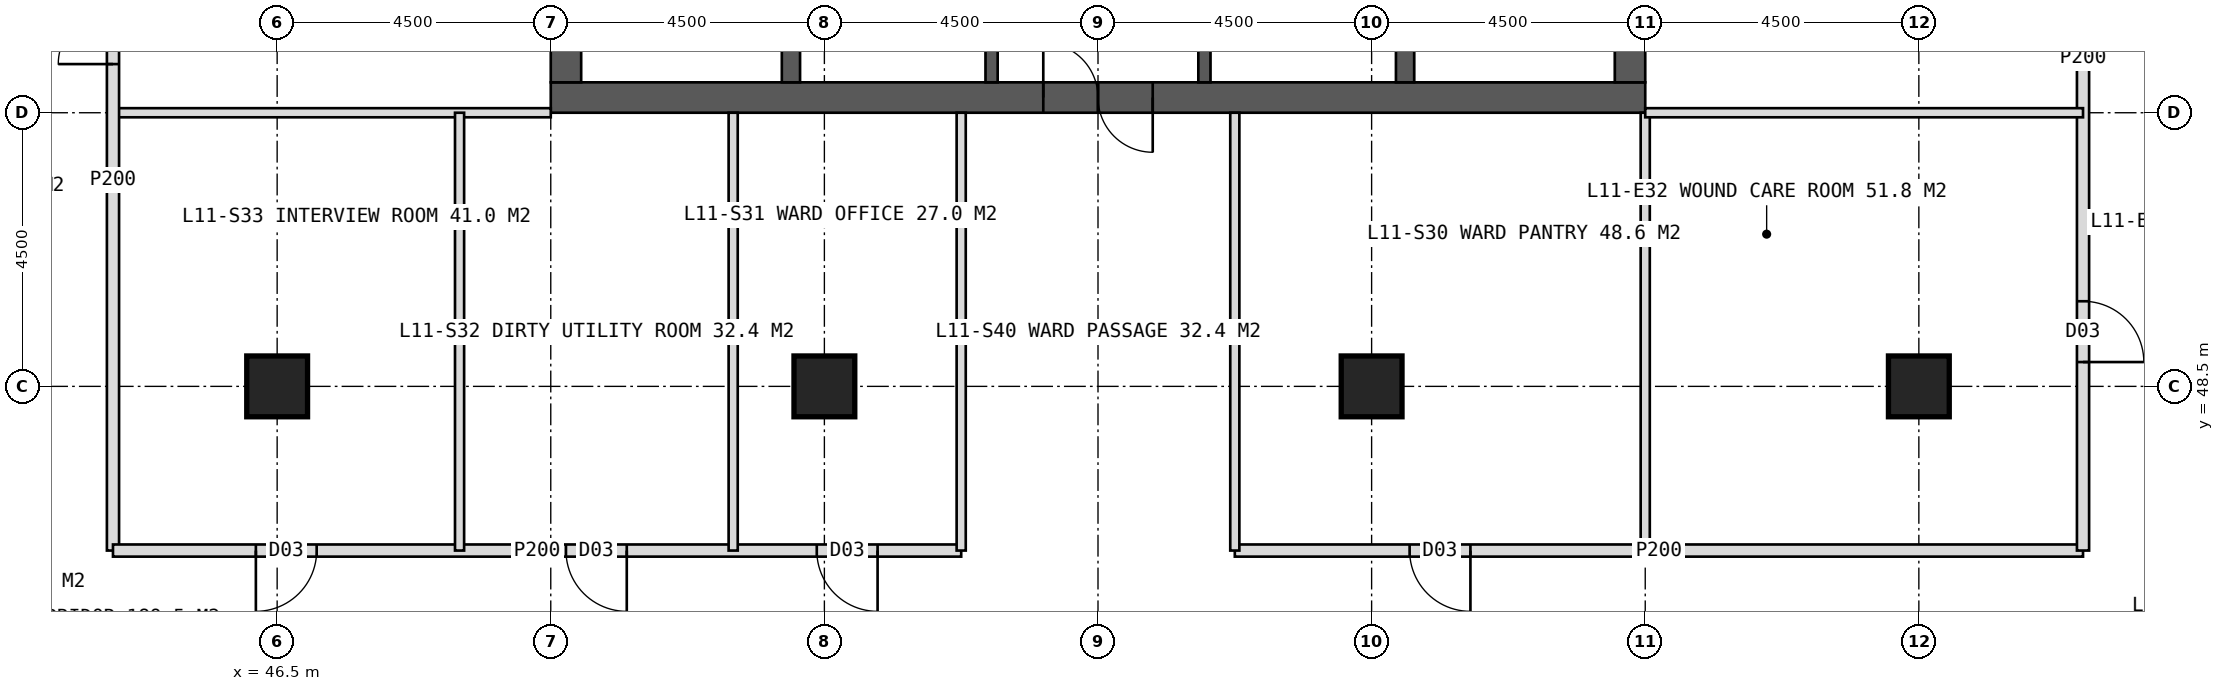
"""IFC4 building model, lengths in metres.
Left out: names, types, materials, properties, quantities, classifications, styles, units other than length and angle.
Written with IfcOpenShell. Run it as: python <this file> out.ifc"""

import sys

from ifc_helpers import new_model, si_unit, direction, frame, frame_2d, origin, origin_2d, place, context, subcontext, project, spatial, rectangle, hollow_rectangle, extrude, element, fill, save


model = new_model("IFC4")
c1 = context("Model", 3, precision=1e-05, world=origin(), true_north=direction((0.0, 1.0)))
c2 = subcontext(c1, "Body", "Model", "MODEL_VIEW")
j1 = project(units=[si_unit("LENGTHUNIT", "METRE"), si_unit("PLANEANGLEUNIT", "RADIAN")], contexts=[c1])
p1 = place(None, origin())
s1 = spatial("IfcSite", under=j1, at=p1, CompositionType="ELEMENT")
p2 = place(p1, origin())
s2 = spatial("IfcBuilding", under=s1, at=p2, CompositionType="ELEMENT")
p3 = place(p2, frame((0.0, 0.0, 51.0)))
s3 = spatial("IfcBuildingStorey", under=s2, at=p3, CompositionType="ELEMENT", Elevation=51.0)
p4 = place(p3, frame((51.0, 53.25, 0.0), z_axis=(0.0, 0.0, 1.0), x_axis=(1.0, 0.0, 0.0)))
e1 = element("IfcWall", 1, at=p4, inside=s3, PredefinedType="SHEAR", context=c2, shape_type="SweptSolid", body=[
    extrude(rectangle(XDim=18.0, YDim=0.5, at=frame_2d((9.0, 0.0))), origin(), (0.0, 0.0, 1.0), 4.0),
])
p5 = place(p4, frame((8.1, 0.0, 0.0)))
e2 = element("IfcOpeningElement", 2, at=p5, cuts=e1, PredefinedType="OPENING", context=c2, shape_type="SweptSolid", body=[
    extrude(rectangle(XDim=1.8, YDim=2.2, at=frame_2d((0.9, 1.1))), frame((0.0, 0.26, 0.0), z_axis=(0.0, -1.0, 0.0), x_axis=(1.0, 0.0, 0.0)), (0.0, 0.0, 1.0), 0.52),
])
p6 = place(p3, frame((51.25, 53.5, 0.0), z_axis=(0.0, 0.0, 1.0), x_axis=(0.0, 1.0, 0.0)))
e3 = element("IfcWall", 3, at=p6, inside=s3, PredefinedType="SHEAR", context=c2, shape_type="SweptSolid", body=[
    extrude(rectangle(XDim=17.0, YDim=0.5, at=frame_2d((8.5, 0.0))), origin(), (0.0, 0.0, 1.0), 4.0),
])
p7 = place(p6, frame((6.0, 0.0, 0.0)))
e4 = element("IfcOpeningElement", 4, at=p7, cuts=e3, PredefinedType="OPENING", context=c2, shape_type="SweptSolid", body=[
    extrude(rectangle(XDim=1.5, YDim=2.2, at=frame_2d((0.75, 1.1))), frame((0.0, 0.26, 0.0), z_axis=(0.0, -1.0, 0.0), x_axis=(1.0, 0.0, 0.0)), (0.0, 0.0, 1.0), 0.52),
])
p8 = place(p3, frame((68.75, 53.5, 0.0), z_axis=(0.0, 0.0, 1.0), x_axis=(0.0, 1.0, 0.0)))
e5 = element("IfcWall", 5, at=p8, inside=s3, PredefinedType="SHEAR", context=c2, shape_type="SweptSolid", body=[
    extrude(rectangle(XDim=17.0, YDim=0.5, at=frame_2d((8.5, 0.0))), origin(), (0.0, 0.0, 1.0), 4.0),
])
p9 = place(p8, frame((9.5, 0.0, 0.0)))
e6 = element("IfcOpeningElement", 6, at=p9, cuts=e5, PredefinedType="OPENING", context=c2, shape_type="SweptSolid", body=[
    extrude(rectangle(XDim=1.5, YDim=2.2, at=frame_2d((0.75, 1.1))), frame((0.0, 0.26, 0.0), z_axis=(0.0, -1.0, 0.0), x_axis=(1.0, 0.0, 0.0)), (0.0, 0.0, 1.0), 0.52),
])
for number, where, z_axis, x_axis in (
    (7, (54.95, 53.5, 0.0), (0.0, 0.0, 1.0), (0.0, 1.0, 0.0)),
    (8, (65.05, 53.5, 0.0), (0.0, 0.0, 1.0), (0.0, 1.0, 0.0)),
):
    element("IfcWall", number, at=place(p3, frame(where, z_axis=z_axis, x_axis=x_axis)), inside=s3, PredefinedType="SHEAR", context=c2, shape_type="SweptSolid", body=[
        extrude(rectangle(XDim=17.0, YDim=0.3, at=frame_2d((8.5, 0.0))), origin(), (0.0, 0.0, 1.0), 4.0),
    ])
p10 = place(p3, frame((58.25, 53.5, 0.0), z_axis=(0.0, 0.0, 1.0), x_axis=(0.0, 1.0, 0.0)))
e9 = element("IfcWall", 9, at=p10, inside=s3, PredefinedType="SHEAR", context=c2, shape_type="SweptSolid", body=[
    extrude(rectangle(XDim=17.0, YDim=0.2, at=frame_2d((8.5, 0.0))), origin(), (0.0, 0.0, 1.0), 4.0),
])
p11 = place(p10, frame((1.375, 0.0, 0.0)))
e10 = element("IfcOpeningElement", 10, at=p11, cuts=e9, PredefinedType="OPENING", context=c2, shape_type="SweptSolid", body=[
    extrude(rectangle(XDim=1.4, YDim=2.2, at=frame_2d((0.7, 1.1))), frame((0.0, 0.11, 0.0), z_axis=(0.0, -1.0, 0.0), x_axis=(1.0, 0.0, 0.0)), (0.0, 0.0, 1.0), 0.22),
])
p12 = place(p10, frame((5.675, 0.0, 0.0)))
e11 = element("IfcOpeningElement", 11, at=p12, cuts=e9, PredefinedType="OPENING", context=c2, shape_type="SweptSolid", body=[
    extrude(rectangle(XDim=1.4, YDim=2.2, at=frame_2d((0.7, 1.1))), frame((0.0, 0.11, 0.0), z_axis=(0.0, -1.0, 0.0), x_axis=(1.0, 0.0, 0.0)), (0.0, 0.0, 1.0), 0.22),
])
p13 = place(p3, frame((61.75, 53.5, 0.0), z_axis=(0.0, 0.0, 1.0), x_axis=(0.0, 1.0, 0.0)))
e12 = element("IfcWall", 12, at=p13, inside=s3, PredefinedType="SHEAR", context=c2, shape_type="SweptSolid", body=[
    extrude(rectangle(XDim=17.0, YDim=0.2, at=frame_2d((8.5, 0.0))), origin(), (0.0, 0.0, 1.0), 4.0),
])
p14 = place(p13, frame((1.375, 0.0, 0.0)))
e13 = element("IfcOpeningElement", 13, at=p14, cuts=e12, PredefinedType="OPENING", context=c2, shape_type="SweptSolid", body=[
    extrude(rectangle(XDim=1.4, YDim=2.2, at=frame_2d((0.7, 1.1))), frame((0.0, 0.11, 0.0), z_axis=(0.0, -1.0, 0.0), x_axis=(1.0, 0.0, 0.0)), (0.0, 0.0, 1.0), 0.22),
])
p15 = place(p13, frame((5.675, 0.0, 0.0)))
e14 = element("IfcOpeningElement", 14, at=p15, cuts=e12, PredefinedType="OPENING", context=c2, shape_type="SweptSolid", body=[
    extrude(rectangle(XDim=1.4, YDim=2.2, at=frame_2d((0.7, 1.1))), frame((0.0, 0.11, 0.0), z_axis=(0.0, -1.0, 0.0), x_axis=(1.0, 0.0, 0.0)), (0.0, 0.0, 1.0), 0.22),
])
for number, where, z_axis, x_axis in (
    (15, (46.5, 48.5, 0.0), (0.0, 0.0, 1.0), (1.0, 0.0, 0.0)),
    (16, (73.5, 48.5, 0.0), (0.0, 0.0, 1.0), (1.0, 0.0, 0.0)),
    (17, (55.5, 48.5, 0.0), (0.0, 0.0, 1.0), (1.0, 0.0, 0.0)),
    (18, (64.5, 48.5, 0.0), (0.0, 0.0, 1.0), (1.0, 0.0, 0.0)),
):
    element("IfcColumn", number, at=place(p3, frame(where, z_axis=z_axis, x_axis=x_axis)), inside=s3, PredefinedType="COLUMN", context=c2, shape_type="SweptSolid", body=[
        extrude(hollow_rectangle(XDim=1.0, YDim=1.0, WallThickness=0.1, at=origin_2d()), origin(), (0.0, 0.0, 1.0), 4.0),
    ])
p16 = place(p3, frame((51.0, 53.0, 0.0), z_axis=(0.0, 0.0, 1.0), x_axis=(-1.0, 0.0, 0.0)))
e19 = element("IfcWall", 19, at=p16, inside=s3, PredefinedType="PARTITIONING", context=c2, shape_type="SweptSolid", body=[
    extrude(rectangle(XDim=7.2, YDim=0.15, at=frame_2d((3.6, 0.0))), origin(), (0.0, 0.0, 1.0), 3.75),
])
p17 = place(p3, frame((43.8, 45.8, 0.0), z_axis=(0.0, 0.0, 1.0), x_axis=(0.0, 1.0, 0.0)))
e20 = element("IfcWall", 20, at=p17, inside=s3, PredefinedType="PARTITIONING", context=c2, shape_type="SweptSolid", body=[
    extrude(rectangle(XDim=12.2, YDim=0.2, at=frame_2d((6.1, 0.0))), origin(), (0.0, 0.0, 1.0), 3.75),
])
p18 = place(p17, frame((8.0, 0.0, 0.0)))
e21 = element("IfcOpeningElement", 21, at=p18, cuts=e20, PredefinedType="OPENING", context=c2, shape_type="SweptSolid", body=[
    extrude(rectangle(XDim=0.9, YDim=2.1, at=frame_2d((0.45, 1.05))), frame((0.0, 0.11, 0.0), z_axis=(0.0, -1.0, 0.0), x_axis=(1.0, 0.0, 0.0)), (0.0, 0.0, 1.0), 0.22),
])
p19 = place(p17, frame((10.5, 0.0, 0.0)))
e22 = element("IfcOpeningElement", 22, at=p19, cuts=e20, PredefinedType="OPENING", context=c2, shape_type="SweptSolid", body=[
    extrude(rectangle(XDim=0.9, YDim=2.1, at=frame_2d((0.45, 1.05))), frame((0.0, 0.11, 0.0), z_axis=(0.0, -1.0, 0.0), x_axis=(1.0, 0.0, 0.0)), (0.0, 0.0, 1.0), 0.22),
])
p20 = place(p3, frame((69.0, 53.0, 0.0), z_axis=(0.0, 0.0, 1.0), x_axis=(0.0, -1.0, 0.0)))
e23 = element("IfcWall", 23, at=p20, inside=s3, PredefinedType="PARTITIONING", context=c2, shape_type="SweptSolid", body=[
    extrude(rectangle(XDim=7.2, YDim=0.15, at=frame_2d((3.6, 0.0))), origin(), (0.0, 0.0, 1.0), 3.75),
])
p21 = place(p3, frame((76.2, 45.8, 0.0), z_axis=(0.0, 0.0, 1.0), x_axis=(-1.0, 0.0, 0.0)))
e24 = element("IfcWall", 24, at=p21, inside=s3, PredefinedType="PARTITIONING", context=c2, shape_type="SweptSolid", body=[
    extrude(rectangle(XDim=13.95, YDim=0.2, at=frame_2d((6.975, 0.0))), origin(), (0.0, 0.0, 1.0), 3.75),
])
p22 = place(p21, frame((10.075, 0.0, 0.0)))
e25 = element("IfcOpeningElement", 25, at=p22, cuts=e24, PredefinedType="OPENING", context=c2, shape_type="SweptSolid", body=[
    extrude(rectangle(XDim=1.0, YDim=2.1, at=frame_2d((0.5, 1.05))), frame((0.0, 0.11, 0.0), z_axis=(0.0, -1.0, 0.0), x_axis=(1.0, 0.0, 0.0)), (0.0, 0.0, 1.0), 0.22),
])
p23 = place(p3, frame((57.75, 45.8, 0.0), z_axis=(0.0, 0.0, 1.0), x_axis=(-1.0, 0.0, 0.0)))
e26 = element("IfcWall", 26, at=p23, inside=s3, PredefinedType="PARTITIONING", context=c2, shape_type="SweptSolid", body=[
    extrude(rectangle(XDim=13.95, YDim=0.2, at=frame_2d((6.975, 0.0))), origin(), (0.0, 0.0, 1.0), 3.75),
])
p24 = place(p23, frame((1.375, 0.0, 0.0)))
e27 = element("IfcOpeningElement", 27, at=p24, cuts=e26, PredefinedType="OPENING", context=c2, shape_type="SweptSolid", body=[
    extrude(rectangle(XDim=1.0, YDim=2.1, at=frame_2d((0.5, 1.05))), frame((0.0, 0.11, 0.0), z_axis=(0.0, -1.0, 0.0), x_axis=(1.0, 0.0, 0.0)), (0.0, 0.0, 1.0), 0.22),
])
p25 = place(p23, frame((5.5, 0.0, 0.0)))
e28 = element("IfcOpeningElement", 28, at=p25, cuts=e26, PredefinedType="OPENING", context=c2, shape_type="SweptSolid", body=[
    extrude(rectangle(XDim=1.0, YDim=2.1, at=frame_2d((0.5, 1.05))), frame((0.0, 0.11, 0.0), z_axis=(0.0, -1.0, 0.0), x_axis=(1.0, 0.0, 0.0)), (0.0, 0.0, 1.0), 0.22),
])
p26 = place(p23, frame((10.6, 0.0, 0.0)))
e29 = element("IfcOpeningElement", 29, at=p26, cuts=e26, PredefinedType="OPENING", context=c2, shape_type="SweptSolid", body=[
    extrude(rectangle(XDim=1.0, YDim=2.1, at=frame_2d((0.5, 1.05))), frame((0.0, 0.11, 0.0), z_axis=(0.0, -1.0, 0.0), x_axis=(1.0, 0.0, 0.0)), (0.0, 0.0, 1.0), 0.22),
])
for number, where, z_axis, x_axis in (
    (30, (62.25, 53.0, 0.0), (0.0, 0.0, 1.0), (0.0, -1.0, 0.0)),
    (31, (57.75, 53.0, 0.0), (0.0, 0.0, 1.0), (0.0, -1.0, 0.0)),
    (32, (54.0, 53.0, 0.0), (0.0, 0.0, 1.0), (0.0, -1.0, 0.0)),
    (33, (49.5, 53.0, 0.0), (0.0, 0.0, 1.0), (0.0, -1.0, 0.0)),
):
    element("IfcWall", number, at=place(p3, frame(where, z_axis=z_axis, x_axis=x_axis)), inside=s3, PredefinedType="PARTITIONING", context=c2, shape_type="SweptSolid", body=[
        extrude(rectangle(XDim=7.2, YDim=0.15, at=frame_2d((3.6, 0.0))), origin(), (0.0, 0.0, 1.0), 3.75),
    ])
p27 = place(p3, frame((76.2, 62.0, 0.0), z_axis=(0.0, 0.0, 1.0), x_axis=(0.0, -1.0, 0.0)))
e34 = element("IfcWall", 34, at=p27, inside=s3, PredefinedType="PARTITIONING", context=c2, shape_type="SweptSolid", body=[
    extrude(rectangle(XDim=16.2, YDim=0.2, at=frame_2d((8.1, 0.0))), origin(), (0.0, 0.0, 1.0), 3.75),
])
p28 = place(p27, frame((4.0, 0.0, 0.0)))
e35 = element("IfcOpeningElement", 35, at=p28, cuts=e34, PredefinedType="OPENING", context=c2, shape_type="SweptSolid", body=[
    extrude(rectangle(XDim=1.0, YDim=2.1, at=frame_2d((0.5, 1.05))), frame((0.0, 0.11, 0.0), z_axis=(0.0, -1.0, 0.0), x_axis=(1.0, 0.0, 0.0)), (0.0, 0.0, 1.0), 0.22),
])
p29 = place(p27, frame((12.1, 0.0, 0.0)))
e36 = element("IfcOpeningElement", 36, at=p29, cuts=e34, PredefinedType="OPENING", context=c2, shape_type="SweptSolid", body=[
    extrude(rectangle(XDim=1.0, YDim=2.1, at=frame_2d((0.5, 1.05))), frame((0.0, 0.11, 0.0), z_axis=(0.0, -1.0, 0.0), x_axis=(1.0, 0.0, 0.0)), (0.0, 0.0, 1.0), 0.22),
])
p30 = place(p3, frame((69.0, 53.0, 0.0), z_axis=(0.0, 0.0, 1.0), x_axis=(1.0, 0.0, 0.0)))
e37 = element("IfcWall", 37, at=p30, inside=s3, PredefinedType="PARTITIONING", context=c2, shape_type="SweptSolid", body=[
    extrude(rectangle(XDim=7.2, YDim=0.15, at=frame_2d((3.6, 0.0))), origin(), (0.0, 0.0, 1.0), 3.75),
])
p31 = place(p18, origin())
e38 = element("IfcDoor", 38, at=p31, inside=s3, OperationType="SINGLE_SWING_LEFT", PredefinedType="DOOR", context=c2, shape_type="SweptSolid", body=[
    extrude(rectangle(XDim=0.9, YDim=2.1, at=frame_2d((0.45, 1.05))), frame((0.0, 0.025, 0.0), z_axis=(0.0, -1.0, 0.0), x_axis=(1.0, 0.0, 0.0)), (0.0, 0.0, 1.0), 0.05),
])
fill(e21, e38)
p32 = place(p22, origin())
e39 = element("IfcDoor", 39, at=p32, inside=s3, OperationType="SINGLE_SWING_LEFT", PredefinedType="DOOR", context=c2, shape_type="SweptSolid", body=[
    extrude(rectangle(XDim=1.0, YDim=2.1, at=frame_2d((0.5, 1.05))), frame((0.0, 0.025, 0.0), z_axis=(0.0, -1.0, 0.0), x_axis=(1.0, 0.0, 0.0)), (0.0, 0.0, 1.0), 0.05),
])
fill(e25, e39)
p33 = place(p24, origin())
e40 = element("IfcDoor", 40, at=p33, inside=s3, OperationType="SINGLE_SWING_LEFT", PredefinedType="DOOR", context=c2, shape_type="SweptSolid", body=[
    extrude(rectangle(XDim=1.0, YDim=2.1, at=frame_2d((0.5, 1.05))), frame((0.0, 0.025, 0.0), z_axis=(0.0, -1.0, 0.0), x_axis=(1.0, 0.0, 0.0)), (0.0, 0.0, 1.0), 0.05),
])
fill(e27, e40)
p34 = place(p25, origin())
e41 = element("IfcDoor", 41, at=p34, inside=s3, OperationType="SINGLE_SWING_LEFT", PredefinedType="DOOR", context=c2, shape_type="SweptSolid", body=[
    extrude(rectangle(XDim=1.0, YDim=2.1, at=frame_2d((0.5, 1.05))), frame((0.0, 0.025, 0.0), z_axis=(0.0, -1.0, 0.0), x_axis=(1.0, 0.0, 0.0)), (0.0, 0.0, 1.0), 0.05),
])
fill(e28, e41)
p35 = place(p26, origin())
e42 = element("IfcDoor", 42, at=p35, inside=s3, OperationType="SINGLE_SWING_RIGHT", PredefinedType="DOOR", context=c2, shape_type="SweptSolid", body=[
    extrude(rectangle(XDim=1.0, YDim=2.1, at=frame_2d((0.5, 1.05))), frame((0.0, 0.025, 0.0), z_axis=(0.0, -1.0, 0.0), x_axis=(1.0, 0.0, 0.0)), (0.0, 0.0, 1.0), 0.05),
])
fill(e29, e42)
p36 = place(p29, origin())
e43 = element("IfcDoor", 43, at=p36, inside=s3, OperationType="SINGLE_SWING_RIGHT", PredefinedType="DOOR", context=c2, shape_type="SweptSolid", body=[
    extrude(rectangle(XDim=1.0, YDim=2.1, at=frame_2d((0.5, 1.05))), frame((0.0, 0.025, 0.0), z_axis=(0.0, -1.0, 0.0), x_axis=(1.0, 0.0, 0.0)), (0.0, 0.0, 1.0), 0.05),
])
fill(e36, e43)
p37 = place(p5, origin())
e44 = element("IfcDoor", 44, at=p37, inside=s3, OperationType="DOUBLE_DOOR_SINGLE_SWING", PredefinedType="DOOR", context=c2, shape_type="SweptSolid", body=[
    extrude(rectangle(XDim=1.8, YDim=2.2, at=frame_2d((0.9, 1.1))), frame((0.0, 0.025, 0.0), z_axis=(0.0, -1.0, 0.0), x_axis=(1.0, 0.0, 0.0)), (0.0, 0.0, 1.0), 0.05),
])
fill(e2, e44)
save(model, sys.argv[1])
